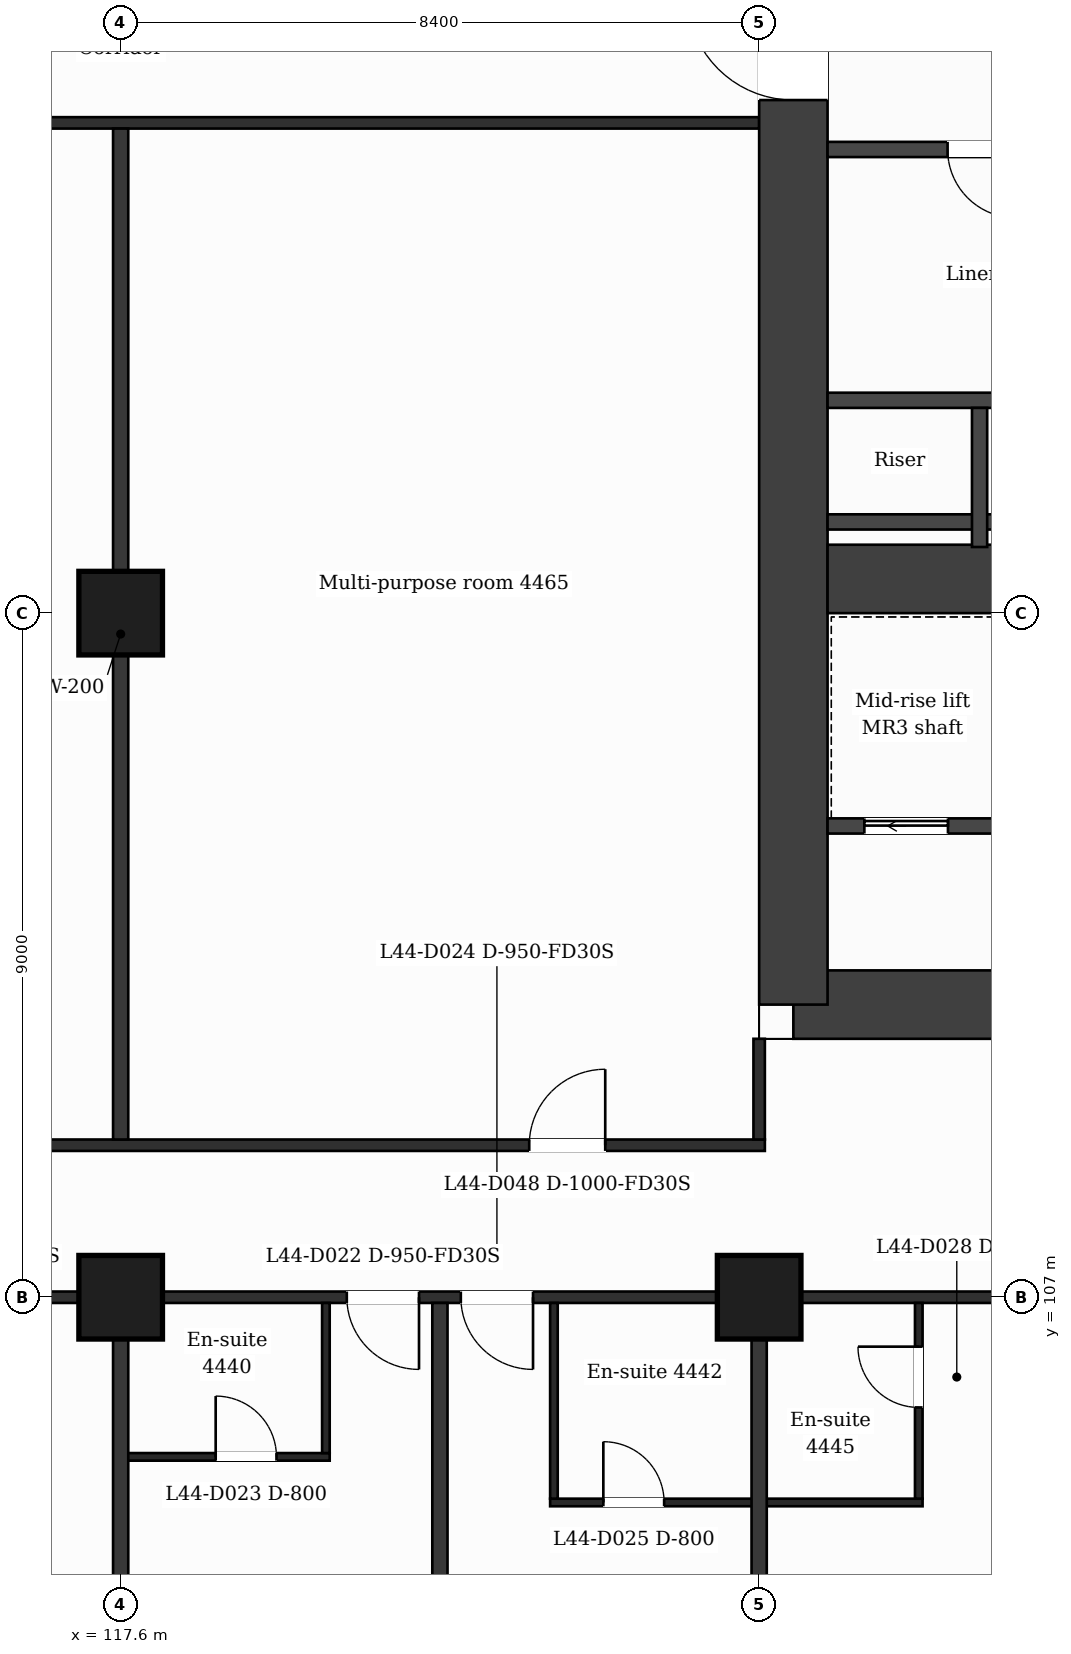
"""IFC4 building model, lengths in metres.
Left out: names, types, materials, properties, quantities, classifications, styles, units other than length and angle.
Written with IfcOpenShell. Run it as: python <this file> out.ifc"""

import sys

from ifc_helpers import new_model, si_unit, direction, frame, frame_2d, origin, origin_2d, place, context, subcontext, project, spatial, rectangle, extrude, element, fill, save


model = new_model("IFC4")
c1 = context("Model", 3, precision=1e-05, world=origin(), true_north=direction((0.0, 1.0)))
c2 = subcontext(c1, "Body", "Model", "MODEL_VIEW")
j1 = project(units=[si_unit("LENGTHUNIT", "METRE"), si_unit("PLANEANGLEUNIT", "RADIAN")], contexts=[c1])
p1 = place(None, origin())
s1 = spatial("IfcSite", under=j1, at=p1, CompositionType="ELEMENT")
p2 = place(p1, origin())
s2 = spatial("IfcBuilding", under=s1, at=p2, CompositionType="ELEMENT")
p3 = place(p2, frame((0.0, 0.0, 184.8)))
s3 = spatial("IfcBuildingStorey", under=s2, at=p3, CompositionType="ELEMENT", Elevation=184.8)
p4 = place(p3, frame((140.616, 110.85, 0.0), z_axis=(0.0, 0.0, 1.0), x_axis=(-1.0, 0.0, 0.0)))
e1 = element("IfcWall", 1, at=p4, inside=s3, PredefinedType="SHEAR", context=c2, shape_type="SweptSolid", body=[
    extrude(rectangle(XDim=14.166, YDim=0.9, at=frame_2d((7.083, 0.0))), origin(), (0.0, 0.0, 1.0), 3.7),
])
p5 = place(p4, frame((6.911, 0.0, 0.0)))
e2 = element("IfcOpeningElement", 2, at=p5, cuts=e1, PredefinedType="OPENING", context=c2, shape_type="SweptSolid", body=[
    extrude(rectangle(XDim=1.4, YDim=2.1, at=frame_2d((0.7, 1.05))), frame((0.0, 0.46, 0.0), z_axis=(0.0, -1.0, 0.0), x_axis=(1.0, 0.0, 0.0)), (0.0, 0.0, 1.0), 0.92),
])
p6 = place(p3, frame((126.45, 110.85, 0.0), z_axis=(0.0, 0.0, 1.0), x_axis=(0.0, 1.0, 0.0)))
e3 = element("IfcWall", 3, at=p6, inside=s3, PredefinedType="SHEAR", context=c2, shape_type="SweptSolid", body=[
    extrude(rectangle(XDim=21.1, YDim=0.9, at=frame_2d((10.55, 0.0))), origin(), (0.0, 0.0, 1.0), 3.7),
])
p7 = place(p6, frame((11.9, 0.0, 0.0)))
e4 = element("IfcOpeningElement", 4, at=p7, cuts=e3, PredefinedType="OPENING", context=c2, shape_type="SweptSolid", body=[
    extrude(rectangle(XDim=1.4, YDim=2.1, at=frame_2d((0.7, 1.05))), frame((0.0, 0.46, 0.0), z_axis=(0.0, -1.0, 0.0), x_axis=(1.0, 0.0, 0.0)), (0.0, 0.0, 1.0), 0.92),
])
p8 = place(p3, frame((126.9, 116.45, 0.0), z_axis=(0.0, 0.0, 1.0), x_axis=(1.0, 0.0, 0.0)))
e5 = element("IfcWall", 5, at=p8, inside=s3, PredefinedType="SHEAR", context=c2, shape_type="SweptSolid", body=[
    extrude(rectangle(XDim=5.1, YDim=0.9, at=frame_2d((2.55, 0.0))), origin(), (0.0, 0.0, 1.0), 3.7),
])
for number, where, z_axis, x_axis in (
    (6, (117.6, 107.0, 0.0), (0.0, 0.0, 1.0), (1.0, 0.0, 0.0)),
    (7, (126.0, 107.0, 0.0), (0.0, 0.0, 1.0), (1.0, 0.0, 0.0)),
    (8, (117.6, 116.0, 0.0), (0.0, 0.0, 1.0), (1.0, 0.0, 0.0)),
):
    element("IfcColumn", number, at=place(p3, frame(where, z_axis=z_axis, x_axis=x_axis)), inside=s3, PredefinedType="COLUMN", context=c2, shape_type="SweptSolid", body=[
        extrude(rectangle(XDim=1.1, YDim=1.1, at=origin_2d()), origin(), (0.0, 0.0, 1.0), 3.7),
    ])
p9 = place(p3, frame((123.25, 104.3, 0.0), z_axis=(0.0, 0.0, 1.0), x_axis=(1.0, 0.0, 0.0)))
e9 = element("IfcWall", 9, at=p9, inside=s3, PredefinedType="PARTITIONING", context=c2, shape_type="SweptSolid", body=[
    extrude(rectangle(XDim=4.9, YDim=0.1, at=frame_2d((2.45, 0.0))), origin(), (0.0, 0.0, 1.0), 3.38),
])
p10 = place(p9, frame((0.7, 0.0, 0.0)))
e10 = element("IfcOpeningElement", 10, at=p10, cuts=e9, PredefinedType="OPENING", context=c2, shape_type="SweptSolid", body=[
    extrude(rectangle(XDim=0.8, YDim=2.1, at=frame_2d((0.4, 1.05))), frame((0.0, 0.06, 0.0), z_axis=(0.0, -1.0, 0.0), x_axis=(1.0, 0.0, 0.0)), (0.0, 0.0, 1.0), 0.12),
])
p11 = place(p3, frame((117.6, 104.9, 0.0), z_axis=(0.0, 0.0, 1.0), x_axis=(1.0, 0.0, 0.0)))
e11 = element("IfcWall", 11, at=p11, inside=s3, PredefinedType="PARTITIONING", context=c2, shape_type="SweptSolid", body=[
    extrude(rectangle(XDim=2.75, YDim=0.1, at=frame_2d((1.375, 0.0))), origin(), (0.0, 0.0, 1.0), 3.38),
])
p12 = place(p11, frame((1.25, 0.0, 0.0)))
e12 = element("IfcOpeningElement", 12, at=p12, cuts=e11, PredefinedType="OPENING", context=c2, shape_type="SweptSolid", body=[
    extrude(rectangle(XDim=0.8, YDim=2.1, at=frame_2d((0.4, 1.05))), frame((0.0, 0.06, 0.0), z_axis=(0.0, -1.0, 0.0), x_axis=(1.0, 0.0, 0.0)), (0.0, 0.0, 1.0), 0.12),
])
p13 = place(p3, frame((87.018, 107.0, 0.0), z_axis=(0.0, 0.0, 1.0), x_axis=(1.0, 0.0, 0.0)))
e13 = element("IfcWall", 13, at=p13, inside=s3, PredefinedType="PARTITIONING", context=c2, shape_type="SweptSolid", body=[
    extrude(rectangle(XDim=52.765, YDim=0.15, at=frame_2d((26.382, 0.0))), origin(), (0.0, 0.0, 1.0), 3.38),
])
p14 = place(p13, frame((0.87, 0.0, 0.0)))
e14 = element("IfcOpeningElement", 14, at=p14, cuts=e13, PredefinedType="OPENING", context=c2, shape_type="SweptSolid", body=[
    extrude(rectangle(XDim=0.95, YDim=2.1, at=frame_2d((0.475, 1.05))), frame((0.0, 0.085, 0.0), z_axis=(0.0, -1.0, 0.0), x_axis=(1.0, 0.0, 0.0)), (0.0, 0.0, 1.0), 0.17),
])
p15 = place(p13, frame((10.757, 0.0, 0.0)))
e15 = element("IfcOpeningElement", 15, at=p15, cuts=e13, PredefinedType="OPENING", context=c2, shape_type="SweptSolid", body=[
    extrude(rectangle(XDim=1.0, YDim=2.1, at=frame_2d((0.5, 1.05))), frame((0.0, 0.085, 0.0), z_axis=(0.0, -1.0, 0.0), x_axis=(1.0, 0.0, 0.0)), (0.0, 0.0, 1.0), 0.17),
])
p16 = place(p13, frame((20.432, 0.0, 0.0)))
e16 = element("IfcOpeningElement", 16, at=p16, cuts=e13, PredefinedType="OPENING", context=c2, shape_type="SweptSolid", body=[
    extrude(rectangle(XDim=0.95, YDim=2.1, at=frame_2d((0.475, 1.05))), frame((0.0, 0.085, 0.0), z_axis=(0.0, -1.0, 0.0), x_axis=(1.0, 0.0, 0.0)), (0.0, 0.0, 1.0), 0.17),
])
p17 = place(p13, frame((27.752, 0.0, 0.0)))
e17 = element("IfcOpeningElement", 17, at=p17, cuts=e13, PredefinedType="OPENING", context=c2, shape_type="SweptSolid", body=[
    extrude(rectangle(XDim=0.95, YDim=2.1, at=frame_2d((0.475, 1.05))), frame((0.0, 0.085, 0.0), z_axis=(0.0, -1.0, 0.0), x_axis=(1.0, 0.0, 0.0)), (0.0, 0.0, 1.0), 0.17),
])
p18 = place(p13, frame((33.557, 0.0, 0.0)))
e18 = element("IfcOpeningElement", 18, at=p18, cuts=e13, PredefinedType="OPENING", context=c2, shape_type="SweptSolid", body=[
    extrude(rectangle(XDim=0.95, YDim=2.1, at=frame_2d((0.475, 1.05))), frame((0.0, 0.085, 0.0), z_axis=(0.0, -1.0, 0.0), x_axis=(1.0, 0.0, 0.0)), (0.0, 0.0, 1.0), 0.17),
])
p19 = place(p13, frame((35.057, 0.0, 0.0)))
e19 = element("IfcOpeningElement", 19, at=p19, cuts=e13, PredefinedType="OPENING", context=c2, shape_type="SweptSolid", body=[
    extrude(rectangle(XDim=0.95, YDim=2.1, at=frame_2d((0.475, 1.05))), frame((0.0, 0.085, 0.0), z_axis=(0.0, -1.0, 0.0), x_axis=(1.0, 0.0, 0.0)), (0.0, 0.0, 1.0), 0.17),
])
p20 = place(p13, frame((45.407, 0.0, 0.0)))
e20 = element("IfcOpeningElement", 20, at=p20, cuts=e13, PredefinedType="OPENING", context=c2, shape_type="SweptSolid", body=[
    extrude(rectangle(XDim=1.0, YDim=2.1, at=frame_2d((0.5, 1.05))), frame((0.0, 0.085, 0.0), z_axis=(0.0, -1.0, 0.0), x_axis=(1.0, 0.0, 0.0)), (0.0, 0.0, 1.0), 0.17),
])
p21 = place(p13, frame((49.285, 0.0, 0.0)))
e21 = element("IfcOpeningElement", 21, at=p21, cuts=e13, PredefinedType="OPENING", context=c2, shape_type="SweptSolid", body=[
    extrude(rectangle(XDim=0.95, YDim=2.1, at=frame_2d((0.475, 1.05))), frame((0.0, 0.085, 0.0), z_axis=(0.0, -1.0, 0.0), x_axis=(1.0, 0.0, 0.0)), (0.0, 0.0, 1.0), 0.17),
])
p22 = place(p3, frame((100.725, 109.0, 0.0), z_axis=(0.0, 0.0, 1.0), x_axis=(1.0, 0.0, 0.0)))
e22 = element("IfcWall", 22, at=p22, inside=s3, PredefinedType="PARTITIONING", context=c2, shape_type="SweptSolid", body=[
    extrude(rectangle(XDim=25.35, YDim=0.15, at=frame_2d((12.675, 0.0))), origin(), (0.0, 0.0, 1.0), 3.38),
])
p23 = place(p22, frame((1.925, 0.0, 0.0)))
e23 = element("IfcOpeningElement", 23, at=p23, cuts=e22, PredefinedType="OPENING", context=c2, shape_type="SweptSolid", body=[
    extrude(rectangle(XDim=1.0, YDim=2.1, at=frame_2d((0.5, 1.05))), frame((0.0, 0.085, 0.0), z_axis=(0.0, -1.0, 0.0), x_axis=(1.0, 0.0, 0.0)), (0.0, 0.0, 1.0), 0.17),
])
p24 = place(p22, frame((5.875, 0.0, 0.0)))
e24 = element("IfcOpeningElement", 24, at=p24, cuts=e22, PredefinedType="OPENING", context=c2, shape_type="SweptSolid", body=[
    extrude(rectangle(XDim=1.0, YDim=2.1, at=frame_2d((0.5, 1.05))), frame((0.0, 0.085, 0.0), z_axis=(0.0, -1.0, 0.0), x_axis=(1.0, 0.0, 0.0)), (0.0, 0.0, 1.0), 0.17),
])
p25 = place(p22, frame((12.845, 0.0, 0.0)))
e25 = element("IfcOpeningElement", 25, at=p25, cuts=e22, PredefinedType="OPENING", context=c2, shape_type="SweptSolid", body=[
    extrude(rectangle(XDim=1.0, YDim=2.1, at=frame_2d((0.5, 1.05))), frame((0.0, 0.085, 0.0), z_axis=(0.0, -1.0, 0.0), x_axis=(1.0, 0.0, 0.0)), (0.0, 0.0, 1.0), 0.17),
])
p26 = place(p22, frame((22.25, 0.0, 0.0)))
e26 = element("IfcOpeningElement", 26, at=p26, cuts=e22, PredefinedType="OPENING", context=c2, shape_type="SweptSolid", body=[
    extrude(rectangle(XDim=1.0, YDim=2.1, at=frame_2d((0.5, 1.05))), frame((0.0, 0.085, 0.0), z_axis=(0.0, -1.0, 0.0), x_axis=(1.0, 0.0, 0.0)), (0.0, 0.0, 1.0), 0.17),
])
p27 = place(p3, frame((126.9, 113.2, 0.0), z_axis=(0.0, 0.0, 1.0), x_axis=(1.0, 0.0, 0.0)))
e27 = element("IfcWall", 27, at=p27, inside=s3, PredefinedType="PARTITIONING", context=c2, shape_type="SweptSolid", body=[
    extrude(rectangle(XDim=4.773, YDim=0.2, at=frame_2d((2.387, 0.0))), origin(), (0.0, 0.0, 1.0), 3.38),
])
p28 = place(p27, frame((0.484, 0.0, 0.0)))
e28 = element("IfcOpeningElement", 28, at=p28, cuts=e27, PredefinedType="OPENING", context=c2, shape_type="SweptSolid", body=[
    extrude(rectangle(XDim=1.1, YDim=2.1, at=frame_2d((0.55, 1.05))), frame((0.0, 0.11, 0.0), z_axis=(0.0, -1.0, 0.0), x_axis=(1.0, 0.0, 0.0)), (0.0, 0.0, 1.0), 0.22),
])
for number, where, z_axis, x_axis in (
    (29, (126.9, 117.2, 0.0), (0.0, 0.0, 1.0), (1.0, 0.0, 0.0)),
    (30, (126.9, 118.8, 0.0), (0.0, 0.0, 1.0), (1.0, 0.0, 0.0)),
):
    element("IfcWall", number, at=place(p3, frame(where, z_axis=z_axis, x_axis=x_axis)), inside=s3, PredefinedType="PARTITIONING", context=c2, shape_type="SweptSolid", body=[
        extrude(rectangle(XDim=4.673, YDim=0.2, at=frame_2d((2.336, 0.0))), origin(), (0.0, 0.0, 1.0), 3.38),
    ])
p29 = place(p3, frame((126.9, 122.1, 0.0), z_axis=(0.0, 0.0, 1.0), x_axis=(1.0, 0.0, 0.0)))
e31 = element("IfcWall", 31, at=p29, inside=s3, PredefinedType="PARTITIONING", context=c2, shape_type="SweptSolid", body=[
    extrude(rectangle(XDim=4.673, YDim=0.2, at=frame_2d((2.336, 0.0))), origin(), (0.0, 0.0, 1.0), 3.38),
])
p30 = place(p29, frame((1.579, 0.0, 0.0)))
e32 = element("IfcOpeningElement", 32, at=p30, cuts=e31, PredefinedType="OPENING", context=c2, shape_type="SweptSolid", body=[
    extrude(rectangle(XDim=0.9, YDim=2.1, at=frame_2d((0.45, 1.05))), frame((0.0, 0.11, 0.0), z_axis=(0.0, -1.0, 0.0), x_axis=(1.0, 0.0, 0.0)), (0.0, 0.0, 1.0), 0.22),
])
p31 = place(p3, frame((100.8, 122.45, 0.0), z_axis=(0.0, 0.0, 1.0), x_axis=(1.0, 0.0, 0.0)))
e33 = element("IfcWall", 33, at=p31, inside=s3, PredefinedType="PARTITIONING", context=c2, shape_type="SweptSolid", body=[
    extrude(rectangle(XDim=25.2, YDim=0.15, at=frame_2d((12.6, 0.0))), origin(), (0.0, 0.0, 1.0), 3.38),
])
p32 = place(p3, frame((117.6, 99.79, 0.0), z_axis=(0.0, 0.0, 1.0), x_axis=(0.0, 1.0, 0.0)))
e34 = element("IfcWall", 34, at=p32, inside=s3, PredefinedType="PARTITIONING", context=c2, shape_type="SweptSolid", body=[
    extrude(rectangle(XDim=7.135, YDim=0.2, at=frame_2d((3.567, 0.0))), origin(), (0.0, 0.0, 1.0), 3.38),
])
p33 = place(p3, frame((117.6, 109.075, 0.0), z_axis=(0.0, 0.0, 1.0), x_axis=(0.0, 1.0, 0.0)))
e35 = element("IfcWall", 35, at=p33, inside=s3, PredefinedType="PARTITIONING", context=c2, shape_type="SweptSolid", body=[
    extrude(rectangle(XDim=13.3, YDim=0.2, at=frame_2d((6.65, 0.0))), origin(), (0.0, 0.0, 1.0), 3.38),
])
p34 = place(p3, frame((120.3, 104.95, 0.0), z_axis=(0.0, 0.0, 1.0), x_axis=(0.0, 1.0, 0.0)))
e36 = element("IfcWall", 36, at=p34, inside=s3, PredefinedType="PARTITIONING", context=c2, shape_type="SweptSolid", body=[
    extrude(rectangle(XDim=1.975, YDim=0.1, at=frame_2d((0.988, 0.0))), origin(), (0.0, 0.0, 1.0), 3.38),
])
p35 = place(p3, frame((121.8, 99.79, 0.0), z_axis=(0.0, 0.0, 1.0), x_axis=(0.0, 1.0, 0.0)))
e37 = element("IfcWall", 37, at=p35, inside=s3, PredefinedType="PARTITIONING", context=c2, shape_type="SweptSolid", body=[
    extrude(rectangle(XDim=7.135, YDim=0.2, at=frame_2d((3.567, 0.0))), origin(), (0.0, 0.0, 1.0), 3.38),
])
p36 = place(p3, frame((123.3, 104.35, 0.0), z_axis=(0.0, 0.0, 1.0), x_axis=(0.0, 1.0, 0.0)))
e38 = element("IfcWall", 38, at=p36, inside=s3, PredefinedType="PARTITIONING", context=c2, shape_type="SweptSolid", body=[
    extrude(rectangle(XDim=2.575, YDim=0.1, at=frame_2d((1.288, 0.0))), origin(), (0.0, 0.0, 1.0), 3.38),
])
p37 = place(p3, frame((126.0, 99.79, 0.0), z_axis=(0.0, 0.0, 1.0), x_axis=(0.0, 1.0, 0.0)))
e39 = element("IfcWall", 39, at=p37, inside=s3, PredefinedType="PARTITIONING", context=c2, shape_type="SweptSolid", body=[
    extrude(rectangle(XDim=7.135, YDim=0.2, at=frame_2d((3.567, 0.0))), origin(), (0.0, 0.0, 1.0), 3.38),
])
p38 = place(p3, frame((126.0, 109.075, 0.0), z_axis=(0.0, 0.0, 1.0), x_axis=(0.0, 1.0, 0.0)))
e40 = element("IfcWall", 40, at=p38, inside=s3, PredefinedType="PARTITIONING", context=c2, shape_type="SweptSolid", body=[
    extrude(rectangle(XDim=1.325, YDim=0.15, at=frame_2d((0.663, 0.0))), origin(), (0.0, 0.0, 1.0), 3.38),
])
p39 = place(p3, frame((128.1, 104.35, 0.0), z_axis=(0.0, 0.0, 1.0), x_axis=(0.0, 1.0, 0.0)))
e41 = element("IfcWall", 41, at=p39, inside=s3, PredefinedType="PARTITIONING", context=c2, shape_type="SweptSolid", body=[
    extrude(rectangle(XDim=2.575, YDim=0.1, at=frame_2d((1.288, 0.0))), origin(), (0.0, 0.0, 1.0), 3.38),
])
p40 = place(p39, frame((1.2, 0.0, 0.0)))
e42 = element("IfcOpeningElement", 42, at=p40, cuts=e41, PredefinedType="OPENING", context=c2, shape_type="SweptSolid", body=[
    extrude(rectangle(XDim=0.8, YDim=2.1, at=frame_2d((0.4, 1.05))), frame((0.0, 0.06, 0.0), z_axis=(0.0, -1.0, 0.0), x_axis=(1.0, 0.0, 0.0)), (0.0, 0.0, 1.0), 0.12),
])
p41 = place(p3, frame((128.9, 116.87, 0.0), z_axis=(0.0, 0.0, 1.0), x_axis=(0.0, 1.0, 0.0)))
e43 = element("IfcWall", 43, at=p41, inside=s3, PredefinedType="PARTITIONING", context=c2, shape_type="SweptSolid", body=[
    extrude(rectangle(XDim=1.83, YDim=0.2, at=frame_2d((0.915, 0.0))), origin(), (0.0, 0.0, 1.0), 3.38),
])
p42 = place(p30, origin())
e44 = element("IfcDoor", 44, at=p42, inside=s3, OperationType="SINGLE_SWING_RIGHT", PredefinedType="DOOR", context=c2, shape_type="SweptSolid", body=[
    extrude(rectangle(XDim=0.9, YDim=2.1, at=frame_2d((0.45, 1.05))), frame((0.0, 0.025, 0.0), z_axis=(0.0, -1.0, 0.0), x_axis=(1.0, 0.0, 0.0)), (0.0, 0.0, 1.0), 0.05),
])
fill(e32, e44)
p43 = place(p28, origin())
e45 = element("IfcDoor", 45, at=p43, inside=s3, OperationType="SLIDING_TO_LEFT", PredefinedType="DOOR", context=c2, shape_type="SweptSolid", body=[
    extrude(rectangle(XDim=1.1, YDim=2.1, at=frame_2d((0.55, 1.05))), frame((0.0, 0.025, 0.0), z_axis=(0.0, -1.0, 0.0), x_axis=(1.0, 0.0, 0.0)), (0.0, 0.0, 1.0), 0.05),
])
fill(e28, e45)
p44 = place(p18, origin())
e46 = element("IfcDoor", 46, at=p44, inside=s3, OperationType="SINGLE_SWING_RIGHT", PredefinedType="DOOR", context=c2, shape_type="SweptSolid", body=[
    extrude(rectangle(XDim=0.95, YDim=2.1, at=frame_2d((0.475, 1.05))), frame((0.0, 0.025, 0.0), z_axis=(0.0, -1.0, 0.0), x_axis=(1.0, 0.0, 0.0)), (0.0, 0.0, 1.0), 0.05),
])
fill(e18, e46)
p45 = place(p12, origin())
e47 = element("IfcDoor", 47, at=p45, inside=s3, OperationType="SINGLE_SWING_LEFT", PredefinedType="DOOR", context=c2, shape_type="SweptSolid", body=[
    extrude(rectangle(XDim=0.8, YDim=2.1, at=frame_2d((0.4, 1.05))), frame((0.0, 0.025, 0.0), z_axis=(0.0, -1.0, 0.0), x_axis=(1.0, 0.0, 0.0)), (0.0, 0.0, 1.0), 0.05),
])
fill(e12, e47)
p46 = place(p19, origin())
e48 = element("IfcDoor", 48, at=p46, inside=s3, OperationType="SINGLE_SWING_RIGHT", PredefinedType="DOOR", context=c2, shape_type="SweptSolid", body=[
    extrude(rectangle(XDim=0.95, YDim=2.1, at=frame_2d((0.475, 1.05))), frame((0.0, 0.025, 0.0), z_axis=(0.0, -1.0, 0.0), x_axis=(1.0, 0.0, 0.0)), (0.0, 0.0, 1.0), 0.05),
])
fill(e19, e48)
p47 = place(p10, origin())
e49 = element("IfcDoor", 49, at=p47, inside=s3, OperationType="SINGLE_SWING_LEFT", PredefinedType="DOOR", context=c2, shape_type="SweptSolid", body=[
    extrude(rectangle(XDim=0.8, YDim=2.1, at=frame_2d((0.4, 1.05))), frame((0.0, 0.025, 0.0), z_axis=(0.0, -1.0, 0.0), x_axis=(1.0, 0.0, 0.0)), (0.0, 0.0, 1.0), 0.05),
])
fill(e10, e49)
p48 = place(p40, origin())
e50 = element("IfcDoor", 50, at=p48, inside=s3, OperationType="SINGLE_SWING_RIGHT", PredefinedType="DOOR", context=c2, shape_type="SweptSolid", body=[
    extrude(rectangle(XDim=0.8, YDim=2.1, at=frame_2d((0.4, 1.05))), frame((0.0, 0.025, 0.0), z_axis=(0.0, -1.0, 0.0), x_axis=(1.0, 0.0, 0.0)), (0.0, 0.0, 1.0), 0.05),
])
fill(e42, e50)
p49 = place(p26, origin())
e51 = element("IfcDoor", 51, at=p49, inside=s3, OperationType="SINGLE_SWING_RIGHT", PredefinedType="DOOR", context=c2, shape_type="SweptSolid", body=[
    extrude(rectangle(XDim=1.0, YDim=2.1, at=frame_2d((0.5, 1.05))), frame((0.0, 0.025, 0.0), z_axis=(0.0, -1.0, 0.0), x_axis=(1.0, 0.0, 0.0)), (0.0, 0.0, 1.0), 0.05),
])
fill(e26, e51)
p50 = place(p7, origin())
e52 = element("IfcDoor", 52, at=p50, inside=s3, OperationType="SINGLE_SWING_RIGHT", PredefinedType="DOOR", context=c2, shape_type="SweptSolid", body=[
    extrude(rectangle(XDim=1.4, YDim=2.1, at=frame_2d((0.7, 1.05))), frame((0.0, 0.025, 0.0), z_axis=(0.0, -1.0, 0.0), x_axis=(1.0, 0.0, 0.0)), (0.0, 0.0, 1.0), 0.05),
])
fill(e4, e52)
save(model, sys.argv[1])
